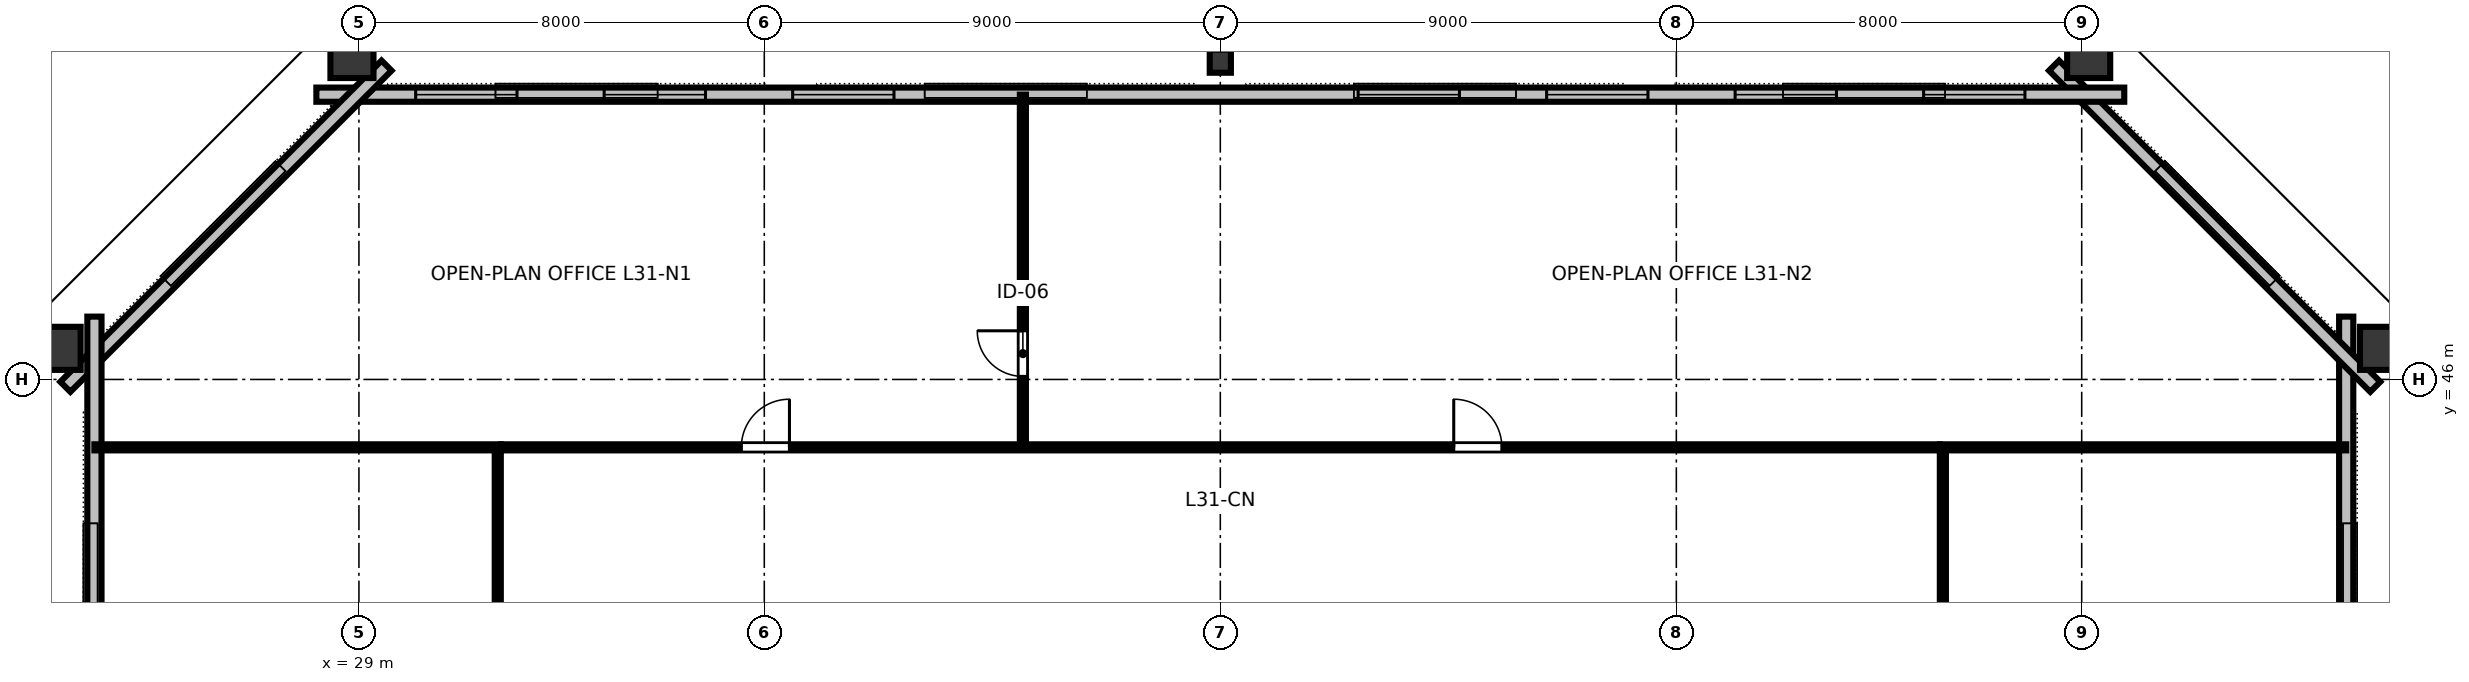
"""IFC4 building model, lengths in metres.
Left out: names, types, materials, properties, quantities, classifications, styles, units other than length and angle.
Written with IfcOpenShell. Run it as: python <this file> out.ifc"""

import sys

from ifc_helpers import new_model, si_unit, direction, frame, frame_2d, origin, origin_2d, place, context, subcontext, project, spatial, rectangle, hollow_rectangle, i_section, extrude, element, fill, save


model = new_model("IFC4")
c1 = context("Model", 3, precision=1e-05, world=origin(), true_north=direction((0.0, 1.0)))
c2 = subcontext(c1, "Body", "Model", "MODEL_VIEW")
j1 = project(units=[si_unit("LENGTHUNIT", "METRE"), si_unit("PLANEANGLEUNIT", "RADIAN")], contexts=[c1])
p1 = place(None, origin())
s1 = spatial("IfcSite", under=j1, at=p1, CompositionType="ELEMENT")
p2 = place(p1, origin())
s2 = spatial("IfcBuilding", under=s1, at=p2, CompositionType="ELEMENT")
p3 = place(p2, frame((0.0, 0.0, 120.4)))
s3 = spatial("IfcBuildingStorey", under=s2, at=p3, CompositionType="ELEMENT", Elevation=120.4)
for number, where, z_axis, x_axis in (
    (1, (68.992, 46.614, 0.0), (0.0, 0.0, 1.0), (0.0, 1.0, 0.0)),
    (2, (63.137, 52.448, 0.0), (0.0, 0.0, 1.0), (1.0, 0.0, 0.0)),
):
    element("IfcColumn", number, at=place(p3, frame(where, z_axis=z_axis, x_axis=x_axis)), inside=s3, PredefinedType="COLUMN", context=c2, shape_type="SweptSolid", body=[
        extrude(hollow_rectangle(XDim=0.85, YDim=1.0, WallThickness=0.05, at=origin_2d()), origin(), (0.0, 0.0, 1.0), 3.358),
    ])
p4 = place(p3, frame((46.0, 52.28, 0.0), z_axis=(0.0, 0.0, 1.0), x_axis=(1.0, 0.0, 0.0)))
e3 = element("IfcColumn", 3, at=p4, inside=s3, PredefinedType="COLUMN", context=c2, shape_type="SweptSolid", body=[
    extrude(i_section(OverallWidth=0.418, OverallDepth=0.455, WebThickness=0.042, FlangeThickness=0.068, FilletRadius=0.025, at=origin_2d()), origin(), (0.0, 0.0, 1.0), 3.358),
])
for number, where, z_axis, x_axis in (
    (4, (28.863, 52.448, 0.0), (0.0, 0.0, 1.0), (1.0, 0.0, 0.0)),
    (5, (23.008, 46.614, 0.0), (0.0, 0.0, 1.0), (0.0, 1.0, 0.0)),
):
    element("IfcColumn", number, at=place(p3, frame(where, z_axis=z_axis, x_axis=x_axis)), inside=s3, PredefinedType="COLUMN", context=c2, shape_type="SweptSolid", body=[
        extrude(hollow_rectangle(XDim=0.85, YDim=1.0, WallThickness=0.05, at=origin_2d()), origin(), (0.0, 0.0, 1.0), 3.358),
    ])
p5 = place(p3, frame((68.22, 16.76, 0.0), z_axis=(0.0, 0.0, 1.0), x_axis=(0.0, 1.0, 0.0)))
e6 = element("IfcWall", 6, at=p5, inside=s3, PredefinedType="STANDARD", context=c2, shape_type="SweptSolid", body=[
    extrude(rectangle(XDim=30.48, YDim=0.28, at=frame_2d((15.24, 0.0))), origin(), (0.0, 0.0, 1.0), 3.36),
])
p6 = place(p5, frame((6.16, 0.0, 0.8)))
e7 = element("IfcOpeningElement", 7, at=p6, cuts=e6, PredefinedType="OPENING", context=c2, shape_type="SweptSolid", body=[
    extrude(rectangle(XDim=2.0, YDim=1.95, at=frame_2d((1.0, 0.975))), frame((0.0, 0.15, 0.0), z_axis=(0.0, -1.0, 0.0), x_axis=(1.0, 0.0, 0.0)), (0.0, 0.0, 1.0), 0.3),
])
p7 = place(p5, frame((22.32, 0.0, 0.8)))
e8 = element("IfcOpeningElement", 8, at=p7, cuts=e6, PredefinedType="OPENING", context=c2, shape_type="SweptSolid", body=[
    extrude(rectangle(XDim=2.0, YDim=1.95, at=frame_2d((1.0, 0.975))), frame((0.0, 0.15, 0.0), z_axis=(0.0, -1.0, 0.0), x_axis=(1.0, 0.0, 0.0)), (0.0, 0.0, 1.0), 0.3),
])
p8 = place(p3, frame((68.794, 45.854, 0.0), z_axis=(0.0, 0.0, 1.0), x_axis=(-0.707106781187, 0.707106781187, 0.0)))
e9 = element("IfcWall", 9, at=p8, inside=s3, PredefinedType="STANDARD", context=c2, shape_type="SweptSolid", body=[
    extrude(rectangle(XDim=8.965, YDim=0.28, at=frame_2d((4.482, 0.0))), origin(), (0.0, 0.0, 1.0), 3.36),
])
p9 = place(p3, frame((63.84, 51.62, 0.0), z_axis=(0.0, 0.0, 1.0), x_axis=(-1.0, 0.0, 0.0)))
e10 = element("IfcWall", 10, at=p9, inside=s3, PredefinedType="STANDARD", context=c2, shape_type="SweptSolid", body=[
    extrude(rectangle(XDim=35.68, YDim=0.28, at=frame_2d((17.84, 0.0))), origin(), (0.0, 0.0, 1.0), 3.36),
])
p10 = place(p9, frame((1.96, 0.0, 0.8)))
e11 = element("IfcOpeningElement", 11, at=p10, cuts=e10, PredefinedType="OPENING", context=c2, shape_type="SweptSolid", body=[
    extrude(rectangle(XDim=2.0, YDim=1.95, at=frame_2d((1.0, 0.975))), frame((0.0, 0.15, 0.0), z_axis=(0.0, -1.0, 0.0), x_axis=(1.0, 0.0, 0.0)), (0.0, 0.0, 1.0), 0.3),
])
p11 = place(p9, frame((5.68, 0.0, 0.8)))
e12 = element("IfcOpeningElement", 12, at=p11, cuts=e10, PredefinedType="OPENING", context=c2, shape_type="SweptSolid", body=[
    extrude(rectangle(XDim=2.0, YDim=1.95, at=frame_2d((1.0, 0.975))), frame((0.0, 0.15, 0.0), z_axis=(0.0, -1.0, 0.0), x_axis=(1.0, 0.0, 0.0)), (0.0, 0.0, 1.0), 0.3),
])
p12 = place(p9, frame((9.4, 0.0, 0.8)))
e13 = element("IfcOpeningElement", 13, at=p12, cuts=e10, PredefinedType="OPENING", context=c2, shape_type="SweptSolid", body=[
    extrude(rectangle(XDim=2.0, YDim=1.95, at=frame_2d((1.0, 0.975))), frame((0.0, 0.15, 0.0), z_axis=(0.0, -1.0, 0.0), x_axis=(1.0, 0.0, 0.0)), (0.0, 0.0, 1.0), 0.3),
])
p13 = place(p9, frame((13.12, 0.0, 0.8)))
e14 = element("IfcOpeningElement", 14, at=p13, cuts=e10, PredefinedType="OPENING", context=c2, shape_type="SweptSolid", body=[
    extrude(rectangle(XDim=2.0, YDim=1.95, at=frame_2d((1.0, 0.975))), frame((0.0, 0.15, 0.0), z_axis=(0.0, -1.0, 0.0), x_axis=(1.0, 0.0, 0.0)), (0.0, 0.0, 1.0), 0.3),
])
p14 = place(p9, frame((24.28, 0.0, 0.8)))
e15 = element("IfcOpeningElement", 15, at=p14, cuts=e10, PredefinedType="OPENING", context=c2, shape_type="SweptSolid", body=[
    extrude(rectangle(XDim=2.0, YDim=1.95, at=frame_2d((1.0, 0.975))), frame((0.0, 0.15, 0.0), z_axis=(0.0, -1.0, 0.0), x_axis=(1.0, 0.0, 0.0)), (0.0, 0.0, 1.0), 0.3),
])
p15 = place(p9, frame((28.0, 0.0, 0.8)))
e16 = element("IfcOpeningElement", 16, at=p15, cuts=e10, PredefinedType="OPENING", context=c2, shape_type="SweptSolid", body=[
    extrude(rectangle(XDim=2.0, YDim=1.95, at=frame_2d((1.0, 0.975))), frame((0.0, 0.15, 0.0), z_axis=(0.0, -1.0, 0.0), x_axis=(1.0, 0.0, 0.0)), (0.0, 0.0, 1.0), 0.3),
])
p16 = place(p9, frame((31.72, 0.0, 0.8)))
e17 = element("IfcOpeningElement", 17, at=p16, cuts=e10, PredefinedType="OPENING", context=c2, shape_type="SweptSolid", body=[
    extrude(rectangle(XDim=2.0, YDim=1.95, at=frame_2d((1.0, 0.975))), frame((0.0, 0.15, 0.0), z_axis=(0.0, -1.0, 0.0), x_axis=(1.0, 0.0, 0.0)), (0.0, 0.0, 1.0), 0.3),
])
p17 = place(p3, frame((29.545, 52.194, 0.0), z_axis=(0.0, 0.0, 1.0), x_axis=(-0.707106781187, -0.707106781187, 0.0)))
e18 = element("IfcWall", 18, at=p17, inside=s3, PredefinedType="STANDARD", context=c2, shape_type="SweptSolid", body=[
    extrude(rectangle(XDim=8.965, YDim=0.28, at=frame_2d((4.482, 0.0))), origin(), (0.0, 0.0, 1.0), 3.36),
])
p18 = place(p3, frame((23.78, 47.24, 0.0), z_axis=(0.0, 0.0, 1.0), x_axis=(0.0, -1.0, 0.0)))
e19 = element("IfcWall", 19, at=p18, inside=s3, PredefinedType="STANDARD", context=c2, shape_type="SweptSolid", body=[
    extrude(rectangle(XDim=30.48, YDim=0.28, at=frame_2d((15.24, 0.0))), origin(), (0.0, 0.0, 1.0), 3.36),
])
p19 = place(p18, frame((6.16, 0.0, 0.8)))
e20 = element("IfcOpeningElement", 20, at=p19, cuts=e19, PredefinedType="OPENING", context=c2, shape_type="SweptSolid", body=[
    extrude(rectangle(XDim=2.0, YDim=1.95, at=frame_2d((1.0, 0.975))), frame((0.0, 0.15, 0.0), z_axis=(0.0, -1.0, 0.0), x_axis=(1.0, 0.0, 0.0)), (0.0, 0.0, 1.0), 0.3),
])
p20 = place(p18, frame((18.28, 0.0, 0.8)))
e21 = element("IfcOpeningElement", 21, at=p20, cuts=e19, PredefinedType="OPENING", context=c2, shape_type="SweptSolid", body=[
    extrude(rectangle(XDim=2.0, YDim=1.95, at=frame_2d((1.0, 0.975))), frame((0.0, 0.15, 0.0), z_axis=(0.0, -1.0, 0.0), x_axis=(1.0, 0.0, 0.0)), (0.0, 0.0, 1.0), 0.3),
])
p21 = place(p18, frame((22.32, 0.0, 0.8)))
e22 = element("IfcOpeningElement", 22, at=p21, cuts=e19, PredefinedType="OPENING", context=c2, shape_type="SweptSolid", body=[
    extrude(rectangle(XDim=2.0, YDim=1.95, at=frame_2d((1.0, 0.975))), frame((0.0, 0.15, 0.0), z_axis=(0.0, -1.0, 0.0), x_axis=(1.0, 0.0, 0.0)), (0.0, 0.0, 1.0), 0.3),
])
p22 = place(p3, frame((42.104, 44.66, 0.0), z_axis=(0.0, 0.0, 1.0), x_axis=(0.0, 1.0, 0.0)))
e23 = element("IfcWall", 23, at=p22, inside=s3, PredefinedType="PARTITIONING", context=c2, shape_type="SweptSolid", body=[
    extrude(rectangle(XDim=6.96, YDim=0.12, at=frame_2d((3.48, 0.0))), origin(), (0.0, 0.0, 1.0), 2.64),
])
p23 = place(p22, frame((1.4, 0.0, 0.0)))
e24 = element("IfcOpeningElement", 24, at=p23, cuts=e23, PredefinedType="OPENING", context=c2, shape_type="SweptSolid", body=[
    extrude(rectangle(XDim=0.9, YDim=2.15, at=frame_2d((0.45, 1.075))), frame((0.0, 0.07, 0.0), z_axis=(0.0, -1.0, 0.0), x_axis=(1.0, 0.0, 0.0)), (0.0, 0.0, 1.0), 0.14),
])
p24 = place(p3, frame((31.8, 44.66, 0.0), z_axis=(0.0, 0.0, 1.0), x_axis=(1.0, 0.0, 0.0)))
e25 = element("IfcWall", 25, at=p24, inside=s3, PredefinedType="PARTITIONING", context=c2, shape_type="SweptSolid", body=[
    extrude(rectangle(XDim=28.4, YDim=0.12, at=frame_2d((14.2, 0.0))), origin(), (0.0, 0.0, 1.0), 2.64),
])
p25 = place(p24, frame((4.747, 0.0, 0.0)))
e26 = element("IfcOpeningElement", 26, at=p25, cuts=e25, PredefinedType="OPENING", context=c2, shape_type="SweptSolid", body=[
    extrude(rectangle(XDim=0.95, YDim=2.15, at=frame_2d((0.475, 1.075))), frame((0.0, 0.07, 0.0), z_axis=(0.0, -1.0, 0.0), x_axis=(1.0, 0.0, 0.0)), (0.0, 0.0, 1.0), 0.14),
])
p26 = place(p24, frame((18.807, 0.0, 0.0)))
e27 = element("IfcOpeningElement", 27, at=p26, cuts=e25, PredefinedType="OPENING", context=c2, shape_type="SweptSolid", body=[
    extrude(rectangle(XDim=0.95, YDim=2.15, at=frame_2d((0.475, 1.075))), frame((0.0, 0.07, 0.0), z_axis=(0.0, -1.0, 0.0), x_axis=(1.0, 0.0, 0.0)), (0.0, 0.0, 1.0), 0.14),
])
p27 = place(p3, frame((31.74, 33.02, 0.0), z_axis=(0.0, 0.0, 1.0), x_axis=(0.0, 1.0, 0.0)))
e28 = element("IfcWall", 28, at=p27, inside=s3, PredefinedType="PARTITIONING", context=c2, shape_type="SweptSolid", body=[
    extrude(rectangle(XDim=11.58, YDim=0.12, at=frame_2d((5.79, 0.0))), origin(), (0.0, 0.0, 1.0), 2.64),
])
p28 = place(p27, frame((0.826, 0.0, 0.0)))
e29 = element("IfcOpeningElement", 29, at=p28, cuts=e28, PredefinedType="OPENING", context=c2, shape_type="SweptSolid", body=[
    extrude(rectangle(XDim=0.95, YDim=2.15, at=frame_2d((0.475, 1.075))), frame((0.0, 0.07, 0.0), z_axis=(0.0, -1.0, 0.0), x_axis=(1.0, 0.0, 0.0)), (0.0, 0.0, 1.0), 0.14),
])
p29 = place(p27, frame((6.516, 0.0, 0.0)))
e30 = element("IfcOpeningElement", 30, at=p29, cuts=e28, PredefinedType="OPENING", context=c2, shape_type="SweptSolid", body=[
    extrude(rectangle(XDim=0.95, YDim=2.15, at=frame_2d((0.475, 1.075))), frame((0.0, 0.07, 0.0), z_axis=(0.0, -1.0, 0.0), x_axis=(1.0, 0.0, 0.0)), (0.0, 0.0, 1.0), 0.14),
])
p30 = place(p3, frame((60.26, 33.02, 0.0), z_axis=(0.0, 0.0, 1.0), x_axis=(0.0, 1.0, 0.0)))
e31 = element("IfcWall", 31, at=p30, inside=s3, PredefinedType="PARTITIONING", context=c2, shape_type="SweptSolid", body=[
    extrude(rectangle(XDim=11.58, YDim=0.12, at=frame_2d((5.79, 0.0))), origin(), (0.0, 0.0, 1.0), 2.64),
])
p31 = place(p30, frame((0.62, 0.0, 0.0)))
e32 = element("IfcOpeningElement", 32, at=p31, cuts=e31, PredefinedType="OPENING", context=c2, shape_type="SweptSolid", body=[
    extrude(rectangle(XDim=0.95, YDim=2.15, at=frame_2d((0.475, 1.075))), frame((0.0, 0.07, 0.0), z_axis=(0.0, -1.0, 0.0), x_axis=(1.0, 0.0, 0.0)), (0.0, 0.0, 1.0), 0.14),
])
p32 = place(p30, frame((6.31, 0.0, 0.0)))
e33 = element("IfcOpeningElement", 33, at=p32, cuts=e31, PredefinedType="OPENING", context=c2, shape_type="SweptSolid", body=[
    extrude(rectangle(XDim=0.95, YDim=2.15, at=frame_2d((0.475, 1.075))), frame((0.0, 0.07, 0.0), z_axis=(0.0, -1.0, 0.0), x_axis=(1.0, 0.0, 0.0)), (0.0, 0.0, 1.0), 0.14),
])
for number, where, z_axis, x_axis in (
    (34, (31.8, 44.66, 0.0), (0.0, 0.0, 1.0), (-1.0, 0.0, 0.0)),
    (35, (60.2, 44.66, 0.0), (0.0, 0.0, 1.0), (1.0, 0.0, 0.0)),
):
    element("IfcWall", number, at=place(p3, frame(where, z_axis=z_axis, x_axis=x_axis)), inside=s3, PredefinedType="PARTITIONING", context=c2, shape_type="SweptSolid", body=[
        extrude(rectangle(XDim=8.02, YDim=0.12, at=frame_2d((4.01, 0.0))), origin(), (0.0, 0.0, 1.0), 2.64),
    ])
p33 = place(p10, origin())
e36 = element("IfcWindow", 36, at=p33, inside=s3, PartitioningType="SINGLE_PANEL", PredefinedType="WINDOW", context=c2, shape_type="SweptSolid", body=[
    extrude(rectangle(XDim=2.0, YDim=1.95, at=frame_2d((1.0, 0.975))), frame((0.0, 0.03, 0.0), z_axis=(0.0, -1.0, 0.0), x_axis=(1.0, 0.0, 0.0)), (0.0, 0.0, 1.0), 0.06),
])
fill(e11, e36)
p34 = place(p11, origin())
e37 = element("IfcWindow", 37, at=p34, inside=s3, PartitioningType="SINGLE_PANEL", PredefinedType="WINDOW", context=c2, shape_type="SweptSolid", body=[
    extrude(rectangle(XDim=2.0, YDim=1.95, at=frame_2d((1.0, 0.975))), frame((0.0, 0.03, 0.0), z_axis=(0.0, -1.0, 0.0), x_axis=(1.0, 0.0, 0.0)), (0.0, 0.0, 1.0), 0.06),
])
fill(e12, e37)
p35 = place(p12, origin())
e38 = element("IfcWindow", 38, at=p35, inside=s3, PartitioningType="SINGLE_PANEL", PredefinedType="WINDOW", context=c2, shape_type="SweptSolid", body=[
    extrude(rectangle(XDim=2.0, YDim=1.95, at=frame_2d((1.0, 0.975))), frame((0.0, 0.03, 0.0), z_axis=(0.0, -1.0, 0.0), x_axis=(1.0, 0.0, 0.0)), (0.0, 0.0, 1.0), 0.06),
])
fill(e13, e38)
p36 = place(p13, origin())
e39 = element("IfcWindow", 39, at=p36, inside=s3, PartitioningType="SINGLE_PANEL", PredefinedType="WINDOW", context=c2, shape_type="SweptSolid", body=[
    extrude(rectangle(XDim=2.0, YDim=1.95, at=frame_2d((1.0, 0.975))), frame((0.0, 0.03, 0.0), z_axis=(0.0, -1.0, 0.0), x_axis=(1.0, 0.0, 0.0)), (0.0, 0.0, 1.0), 0.06),
])
fill(e14, e39)
p37 = place(p14, origin())
e40 = element("IfcWindow", 40, at=p37, inside=s3, PartitioningType="SINGLE_PANEL", PredefinedType="WINDOW", context=c2, shape_type="SweptSolid", body=[
    extrude(rectangle(XDim=2.0, YDim=1.95, at=frame_2d((1.0, 0.975))), frame((0.0, 0.03, 0.0), z_axis=(0.0, -1.0, 0.0), x_axis=(1.0, 0.0, 0.0)), (0.0, 0.0, 1.0), 0.06),
])
fill(e15, e40)
p38 = place(p15, origin())
e41 = element("IfcWindow", 41, at=p38, inside=s3, PartitioningType="SINGLE_PANEL", PredefinedType="WINDOW", context=c2, shape_type="SweptSolid", body=[
    extrude(rectangle(XDim=2.0, YDim=1.95, at=frame_2d((1.0, 0.975))), frame((0.0, 0.03, 0.0), z_axis=(0.0, -1.0, 0.0), x_axis=(1.0, 0.0, 0.0)), (0.0, 0.0, 1.0), 0.06),
])
fill(e16, e41)
p39 = place(p16, origin())
e42 = element("IfcWindow", 42, at=p39, inside=s3, PartitioningType="SINGLE_PANEL", PredefinedType="WINDOW", context=c2, shape_type="SweptSolid", body=[
    extrude(rectangle(XDim=2.0, YDim=1.95, at=frame_2d((1.0, 0.975))), frame((0.0, 0.03, 0.0), z_axis=(0.0, -1.0, 0.0), x_axis=(1.0, 0.0, 0.0)), (0.0, 0.0, 1.0), 0.06),
])
fill(e17, e42)
p40 = place(p23, origin())
e43 = element("IfcDoor", 43, at=p40, inside=s3, OperationType="SINGLE_SWING_RIGHT", PredefinedType="DOOR", context=c2, shape_type="SweptSolid", body=[
    extrude(rectangle(XDim=0.9, YDim=2.15, at=frame_2d((0.45, 1.075))), frame((0.0, 0.025, 0.0), z_axis=(0.0, -1.0, 0.0), x_axis=(1.0, 0.0, 0.0)), (0.0, 0.0, 1.0), 0.05),
])
fill(e24, e43)
p41 = place(p25, origin())
e44 = element("IfcDoor", 44, at=p41, inside=s3, OperationType="SINGLE_SWING_RIGHT", PredefinedType="DOOR", context=c2, shape_type="SweptSolid", body=[
    extrude(rectangle(XDim=0.95, YDim=2.15, at=frame_2d((0.475, 1.075))), frame((0.0, 0.025, 0.0), z_axis=(0.0, -1.0, 0.0), x_axis=(1.0, 0.0, 0.0)), (0.0, 0.0, 1.0), 0.05),
])
fill(e26, e44)
p42 = place(p26, origin())
e45 = element("IfcDoor", 45, at=p42, inside=s3, OperationType="SINGLE_SWING_LEFT", PredefinedType="DOOR", context=c2, shape_type="SweptSolid", body=[
    extrude(rectangle(XDim=0.95, YDim=2.15, at=frame_2d((0.475, 1.075))), frame((0.0, 0.025, 0.0), z_axis=(0.0, -1.0, 0.0), x_axis=(1.0, 0.0, 0.0)), (0.0, 0.0, 1.0), 0.05),
])
fill(e27, e45)
save(model, sys.argv[1])
